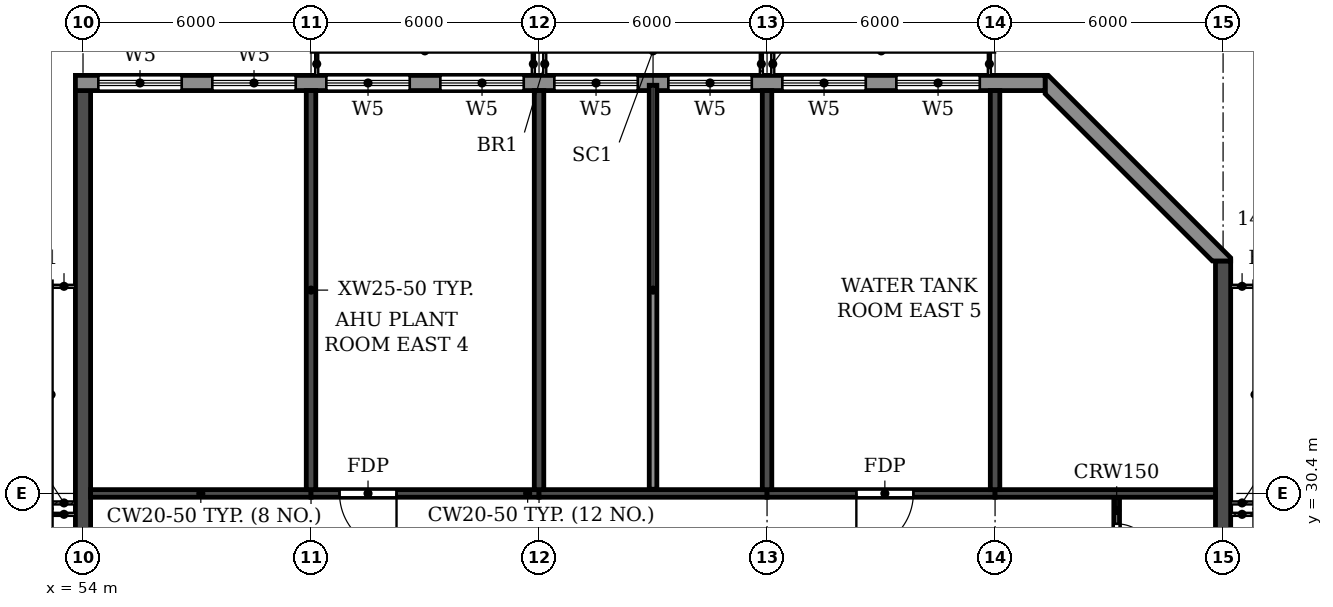
"""IFC4 building model, lengths in metres.
Left out: names, types, materials, properties, quantities, classifications, styles, units other than length and angle.
Written with IfcOpenShell. Run it as: python <this file> out.ifc"""

import sys

from ifc_helpers import new_model, si_unit, direction, frame, frame_2d, origin, place, context, subcontext, project, spatial, polyline, rectangle, outline, extrude, element, fill, save


model = new_model("IFC4")
c1 = context("Model", 3, precision=1e-05, world=origin(), true_north=direction((0.0, 1.0)))
c2 = subcontext(c1, "Body", "Model", "MODEL_VIEW")
j1 = project(units=[si_unit("LENGTHUNIT", "METRE"), si_unit("PLANEANGLEUNIT", "RADIAN")], contexts=[c1])
p1 = place(None, origin())
s1 = spatial("IfcSite", under=j1, at=p1, CompositionType="ELEMENT")
p2 = place(p1, origin())
s2 = spatial("IfcBuilding", under=s1, at=p2, CompositionType="ELEMENT")
p3 = place(p2, frame((0.0, 0.0, 279.0)))
s3 = spatial("IfcBuildingStorey", under=s2, at=p3, CompositionType="ELEMENT", Elevation=279.0)
for number, where, z_axis, x_axis in (
    (1, (60.0, 30.5, 0.0), (0.0, 0.0, 1.0), (0.0, 1.0, 0.0)),
    (2, (66.0, 30.5, 0.0), (0.0, 0.0, 1.0), (0.0, 1.0, 0.0)),
    (3, (72.0, 30.5, 0.0), (0.0, 0.0, 1.0), (0.0, 1.0, 0.0)),
    (4, (78.0, 30.5, 0.0), (0.0, 0.0, 1.0), (0.0, 1.0, 0.0)),
):
    element("IfcWall", number, at=place(p3, frame(where, z_axis=z_axis, x_axis=x_axis)), inside=s3, PredefinedType="SHEAR", context=c2, shape_type="SweptSolid", body=[
        extrude(rectangle(XDim=10.5, YDim=0.25, at=frame_2d((5.25, 0.0))), origin(), (0.0, 0.0, 1.0), 3.05),
    ])
p4 = place(p3, frame((54.0, 0.2, 0.0), z_axis=(0.0, 0.0, 1.0), x_axis=(0.0, 1.0, 0.0)))
e5 = element("IfcWall", 5, at=p4, inside=s3, PredefinedType="SHEAR", context=c2, shape_type="SweptSolid", body=[
    extrude(rectangle(XDim=40.8, YDim=0.4, at=frame_2d((20.4, 0.0))), origin(), (0.0, 0.0, 1.0), 3.05),
])
p5 = place(p3, frame((84.0, 4.683, 0.0), z_axis=(0.0, 0.0, 1.0), x_axis=(0.0, 1.0, 0.0)))
e6 = element("IfcWall", 6, at=p5, inside=s3, PredefinedType="SHEAR", context=c2, shape_type="SweptSolid", body=[
    extrude(rectangle(XDim=31.834, YDim=0.4, at=frame_2d((15.917, 0.0))), origin(), (0.0, 0.0, 1.0), 3.05),
])
p6 = place(p3, frame((54.2, 30.4, 0.0), z_axis=(0.0, 0.0, 1.0), x_axis=(1.0, 0.0, 0.0)))
e7 = element("IfcWall", 7, at=p6, inside=s3, PredefinedType="SHEAR", context=c2, shape_type="SweptSolid", body=[
    extrude(rectangle(XDim=5.8, YDim=0.2, at=frame_2d((2.9, 0.0))), origin(), (0.0, 0.0, 1.0), 2.45),
])
p7 = place(p3, frame((60.0, 30.4, 0.0), z_axis=(0.0, 0.0, 1.0), x_axis=(1.0, 0.0, 0.0)))
e8 = element("IfcWall", 8, at=p7, inside=s3, PredefinedType="SHEAR", context=c2, shape_type="SweptSolid", body=[
    extrude(rectangle(XDim=6.0, YDim=0.2, at=frame_2d((3.0, 0.0))), origin(), (0.0, 0.0, 1.0), 2.45),
])
p8 = place(p7, frame((0.75, 0.0, 0.0)))
e9 = element("IfcOpeningElement", 9, at=p8, cuts=e8, PredefinedType="OPENING", context=c2, shape_type="SweptSolid", body=[
    extrude(rectangle(XDim=1.5, YDim=2.1, at=frame_2d((0.75, 1.05))), frame((0.0, 0.11, 0.0), z_axis=(0.0, -1.0, 0.0), x_axis=(1.0, 0.0, 0.0)), (0.0, 0.0, 1.0), 0.22),
])
p9 = place(p3, frame((66.0, 30.4, 0.0), z_axis=(0.0, 0.0, 1.0), x_axis=(1.0, 0.0, 0.0)))
e10 = element("IfcWall", 10, at=p9, inside=s3, PredefinedType="SHEAR", context=c2, shape_type="SweptSolid", body=[
    extrude(rectangle(XDim=6.0, YDim=0.2, at=frame_2d((3.0, 0.0))), origin(), (0.0, 0.0, 1.0), 2.45),
])
p10 = place(p3, frame((72.0, 30.4, 0.0), z_axis=(0.0, 0.0, 1.0), x_axis=(1.0, 0.0, 0.0)))
e11 = element("IfcWall", 11, at=p10, inside=s3, PredefinedType="SHEAR", context=c2, shape_type="SweptSolid", body=[
    extrude(rectangle(XDim=6.0, YDim=0.2, at=frame_2d((3.0, 0.0))), origin(), (0.0, 0.0, 1.0), 2.45),
])
p11 = place(p10, frame((2.35, 0.0, 0.0)))
e12 = element("IfcOpeningElement", 12, at=p11, cuts=e11, PredefinedType="OPENING", context=c2, shape_type="SweptSolid", body=[
    extrude(rectangle(XDim=1.5, YDim=2.1, at=frame_2d((0.75, 1.05))), frame((0.0, 0.11, 0.0), z_axis=(0.0, -1.0, 0.0), x_axis=(1.0, 0.0, 0.0)), (0.0, 0.0, 1.0), 0.22),
])
p12 = place(p3, frame((78.0, 30.4, 0.0), z_axis=(0.0, 0.0, 1.0), x_axis=(1.0, 0.0, 0.0)))
e13 = element("IfcWall", 13, at=p12, inside=s3, PredefinedType="SHEAR", context=c2, shape_type="SweptSolid", body=[
    extrude(rectangle(XDim=5.8, YDim=0.2, at=frame_2d((2.9, 0.0))), origin(), (0.0, 0.0, 1.0), 2.45),
])
p13 = place(p3, origin())
e14 = element("IfcWall", 14, at=p13, inside=s3, PredefinedType="STANDARD", context=c2, shape_type="SweptSolid", body=[
    extrude(outline(polyline([(84.2, 36.517), (84.2, 36.6), (79.4, 41.4), (79.317, 41.4), (79.317, 40.917), (83.717, 36.517), (84.2, 36.517)])), origin(), (0.0, 0.0, 1.0), 3.05),
])
p14 = place(p3, frame((79.317, 41.2, 0.0), z_axis=(0.0, 0.0, 1.0), x_axis=(-1.0, 0.0, 0.0)))
e15 = element("IfcWall", 15, at=p14, inside=s3, PredefinedType="STANDARD", context=c2, shape_type="SweptSolid", body=[
    extrude(rectangle(XDim=25.517, YDim=0.4, at=frame_2d((12.759, 0.0))), origin(), (0.0, 0.0, 1.0), 3.05),
])
p15 = place(p14, frame((22.717, 0.0, 0.6)))
e16 = element("IfcOpeningElement", 16, at=p15, cuts=e15, PredefinedType="OPENING", context=c2, shape_type="SweptSolid", body=[
    extrude(rectangle(XDim=2.2, YDim=2.4, at=frame_2d((1.1, 1.2))), frame((0.0, 0.21, 0.0), z_axis=(0.0, -1.0, 0.0), x_axis=(1.0, 0.0, 0.0)), (0.0, 0.0, 1.0), 0.42),
])
p16 = place(p14, frame((19.717, 0.0, 0.6)))
e17 = element("IfcOpeningElement", 17, at=p16, cuts=e15, PredefinedType="OPENING", context=c2, shape_type="SweptSolid", body=[
    extrude(rectangle(XDim=2.2, YDim=2.4, at=frame_2d((1.1, 1.2))), frame((0.0, 0.21, 0.0), z_axis=(0.0, -1.0, 0.0), x_axis=(1.0, 0.0, 0.0)), (0.0, 0.0, 1.0), 0.42),
])
p17 = place(p14, frame((16.717, 0.0, 0.6)))
e18 = element("IfcOpeningElement", 18, at=p17, cuts=e15, PredefinedType="OPENING", context=c2, shape_type="SweptSolid", body=[
    extrude(rectangle(XDim=2.2, YDim=2.4, at=frame_2d((1.1, 1.2))), frame((0.0, 0.21, 0.0), z_axis=(0.0, -1.0, 0.0), x_axis=(1.0, 0.0, 0.0)), (0.0, 0.0, 1.0), 0.42),
])
p18 = place(p14, frame((13.717, 0.0, 0.6)))
e19 = element("IfcOpeningElement", 19, at=p18, cuts=e15, PredefinedType="OPENING", context=c2, shape_type="SweptSolid", body=[
    extrude(rectangle(XDim=2.2, YDim=2.4, at=frame_2d((1.1, 1.2))), frame((0.0, 0.21, 0.0), z_axis=(0.0, -1.0, 0.0), x_axis=(1.0, 0.0, 0.0)), (0.0, 0.0, 1.0), 0.42),
])
p19 = place(p14, frame((10.717, 0.0, 0.6)))
e20 = element("IfcOpeningElement", 20, at=p19, cuts=e15, PredefinedType="OPENING", context=c2, shape_type="SweptSolid", body=[
    extrude(rectangle(XDim=2.2, YDim=2.4, at=frame_2d((1.1, 1.2))), frame((0.0, 0.21, 0.0), z_axis=(0.0, -1.0, 0.0), x_axis=(1.0, 0.0, 0.0)), (0.0, 0.0, 1.0), 0.42),
])
p20 = place(p14, frame((7.717, 0.0, 0.6)))
e21 = element("IfcOpeningElement", 21, at=p20, cuts=e15, PredefinedType="OPENING", context=c2, shape_type="SweptSolid", body=[
    extrude(rectangle(XDim=2.2, YDim=2.4, at=frame_2d((1.1, 1.2))), frame((0.0, 0.21, 0.0), z_axis=(0.0, -1.0, 0.0), x_axis=(1.0, 0.0, 0.0)), (0.0, 0.0, 1.0), 0.42),
])
p21 = place(p14, frame((4.717, 0.0, 0.6)))
e22 = element("IfcOpeningElement", 22, at=p21, cuts=e15, PredefinedType="OPENING", context=c2, shape_type="SweptSolid", body=[
    extrude(rectangle(XDim=2.2, YDim=2.4, at=frame_2d((1.1, 1.2))), frame((0.0, 0.21, 0.0), z_axis=(0.0, -1.0, 0.0), x_axis=(1.0, 0.0, 0.0)), (0.0, 0.0, 1.0), 0.42),
])
p22 = place(p14, frame((1.717, 0.0, 0.6)))
e23 = element("IfcOpeningElement", 23, at=p22, cuts=e15, PredefinedType="OPENING", context=c2, shape_type="SweptSolid", body=[
    extrude(rectangle(XDim=2.2, YDim=2.4, at=frame_2d((1.1, 1.2))), frame((0.0, 0.21, 0.0), z_axis=(0.0, -1.0, 0.0), x_axis=(1.0, 0.0, 0.0)), (0.0, 0.0, 1.0), 0.42),
])
p23 = place(p3, frame((81.2, 27.9, 0.0), z_axis=(0.0, 0.0, 1.0), x_axis=(0.0, 1.0, 0.0)))
e24 = element("IfcWall", 24, at=p23, inside=s3, PredefinedType="PARTITIONING", context=c2, shape_type="SweptSolid", body=[
    extrude(rectangle(XDim=2.39, YDim=0.15, at=frame_2d((1.195, 0.0))), origin(), (0.0, 0.0, 1.0), 3.05),
])
p24 = place(p23, frame((0.7, 0.0, 0.0)))
e25 = element("IfcOpeningElement", 25, at=p24, cuts=e24, PredefinedType="OPENING", context=c2, shape_type="SweptSolid", body=[
    extrude(rectangle(XDim=1.0, YDim=2.1, at=frame_2d((0.5, 1.05))), frame((0.0, 0.085, 0.0), z_axis=(0.0, -1.0, 0.0), x_axis=(1.0, 0.0, 0.0)), (0.0, 0.0, 1.0), 0.17),
])
p25 = place(p3, frame((69.0, 30.51, 0.0), z_axis=(0.0, 0.0, 1.0), x_axis=(0.0, 1.0, 0.0)))
e26 = element("IfcWall", 26, at=p25, inside=s3, PredefinedType="PARTITIONING", context=c2, shape_type="SweptSolid", body=[
    extrude(rectangle(XDim=10.63, YDim=0.2, at=frame_2d((5.315, 0.0))), origin(), (0.0, 0.0, 1.0), 3.05),
])
p26 = place(p15, origin())
e27 = element("IfcWindow", 27, at=p26, inside=s3, PartitioningType="TRIPLE_PANEL_HORIZONTAL", PredefinedType="WINDOW", context=c2, shape_type="SweptSolid", body=[
    extrude(rectangle(XDim=2.2, YDim=2.4, at=frame_2d((1.1, 1.2))), frame((0.0, 0.03, 0.0), z_axis=(0.0, -1.0, 0.0), x_axis=(1.0, 0.0, 0.0)), (0.0, 0.0, 1.0), 0.06),
])
fill(e16, e27)
p27 = place(p16, origin())
e28 = element("IfcWindow", 28, at=p27, inside=s3, PartitioningType="TRIPLE_PANEL_HORIZONTAL", PredefinedType="WINDOW", context=c2, shape_type="SweptSolid", body=[
    extrude(rectangle(XDim=2.2, YDim=2.4, at=frame_2d((1.1, 1.2))), frame((0.0, 0.03, 0.0), z_axis=(0.0, -1.0, 0.0), x_axis=(1.0, 0.0, 0.0)), (0.0, 0.0, 1.0), 0.06),
])
fill(e17, e28)
p28 = place(p17, origin())
e29 = element("IfcWindow", 29, at=p28, inside=s3, PartitioningType="TRIPLE_PANEL_HORIZONTAL", PredefinedType="WINDOW", context=c2, shape_type="SweptSolid", body=[
    extrude(rectangle(XDim=2.2, YDim=2.4, at=frame_2d((1.1, 1.2))), frame((0.0, 0.03, 0.0), z_axis=(0.0, -1.0, 0.0), x_axis=(1.0, 0.0, 0.0)), (0.0, 0.0, 1.0), 0.06),
])
fill(e18, e29)
p29 = place(p18, origin())
e30 = element("IfcWindow", 30, at=p29, inside=s3, PartitioningType="TRIPLE_PANEL_HORIZONTAL", PredefinedType="WINDOW", context=c2, shape_type="SweptSolid", body=[
    extrude(rectangle(XDim=2.2, YDim=2.4, at=frame_2d((1.1, 1.2))), frame((0.0, 0.03, 0.0), z_axis=(0.0, -1.0, 0.0), x_axis=(1.0, 0.0, 0.0)), (0.0, 0.0, 1.0), 0.06),
])
fill(e19, e30)
p30 = place(p19, origin())
e31 = element("IfcWindow", 31, at=p30, inside=s3, PartitioningType="TRIPLE_PANEL_HORIZONTAL", PredefinedType="WINDOW", context=c2, shape_type="SweptSolid", body=[
    extrude(rectangle(XDim=2.2, YDim=2.4, at=frame_2d((1.1, 1.2))), frame((0.0, 0.03, 0.0), z_axis=(0.0, -1.0, 0.0), x_axis=(1.0, 0.0, 0.0)), (0.0, 0.0, 1.0), 0.06),
])
fill(e20, e31)
p31 = place(p20, origin())
e32 = element("IfcWindow", 32, at=p31, inside=s3, PartitioningType="TRIPLE_PANEL_HORIZONTAL", PredefinedType="WINDOW", context=c2, shape_type="SweptSolid", body=[
    extrude(rectangle(XDim=2.2, YDim=2.4, at=frame_2d((1.1, 1.2))), frame((0.0, 0.03, 0.0), z_axis=(0.0, -1.0, 0.0), x_axis=(1.0, 0.0, 0.0)), (0.0, 0.0, 1.0), 0.06),
])
fill(e21, e32)
p32 = place(p21, origin())
e33 = element("IfcWindow", 33, at=p32, inside=s3, PartitioningType="TRIPLE_PANEL_HORIZONTAL", PredefinedType="WINDOW", context=c2, shape_type="SweptSolid", body=[
    extrude(rectangle(XDim=2.2, YDim=2.4, at=frame_2d((1.1, 1.2))), frame((0.0, 0.03, 0.0), z_axis=(0.0, -1.0, 0.0), x_axis=(1.0, 0.0, 0.0)), (0.0, 0.0, 1.0), 0.06),
])
fill(e22, e33)
p33 = place(p22, origin())
e34 = element("IfcWindow", 34, at=p33, inside=s3, PartitioningType="TRIPLE_PANEL_HORIZONTAL", PredefinedType="WINDOW", context=c2, shape_type="SweptSolid", body=[
    extrude(rectangle(XDim=2.2, YDim=2.4, at=frame_2d((1.1, 1.2))), frame((0.0, 0.03, 0.0), z_axis=(0.0, -1.0, 0.0), x_axis=(1.0, 0.0, 0.0)), (0.0, 0.0, 1.0), 0.06),
])
fill(e23, e34)
p34 = place(p8, frame((1.5, 0.0, 0.0), z_axis=(0.0, 0.0, 1.0), x_axis=(-1.0, 0.0, 0.0)))
e35 = element("IfcDoor", 35, at=p34, inside=s3, OperationType="DOUBLE_DOOR_SINGLE_SWING", PredefinedType="DOOR", context=c2, shape_type="SweptSolid", body=[
    extrude(rectangle(XDim=1.5, YDim=2.1, at=frame_2d((0.75, 1.05))), frame((0.0, 0.025, 0.0), z_axis=(0.0, -1.0, 0.0), x_axis=(1.0, 0.0, 0.0)), (0.0, 0.0, 1.0), 0.05),
])
fill(e9, e35)
p35 = place(p11, frame((1.5, 0.0, 0.0), z_axis=(0.0, 0.0, 1.0), x_axis=(-1.0, 0.0, 0.0)))
e36 = element("IfcDoor", 36, at=p35, inside=s3, OperationType="DOUBLE_DOOR_SINGLE_SWING", PredefinedType="DOOR", context=c2, shape_type="SweptSolid", body=[
    extrude(rectangle(XDim=1.5, YDim=2.1, at=frame_2d((0.75, 1.05))), frame((0.0, 0.025, 0.0), z_axis=(0.0, -1.0, 0.0), x_axis=(1.0, 0.0, 0.0)), (0.0, 0.0, 1.0), 0.05),
])
fill(e12, e36)
p36 = place(p24, frame((1.0, 0.0, 0.0), z_axis=(0.0, 0.0, 1.0), x_axis=(-1.0, 0.0, 0.0)))
e37 = element("IfcDoor", 37, at=p36, inside=s3, OperationType="SINGLE_SWING_RIGHT", PredefinedType="DOOR", context=c2, shape_type="SweptSolid", body=[
    extrude(rectangle(XDim=1.0, YDim=2.1, at=frame_2d((0.5, 1.05))), frame((0.0, 0.025, 0.0), z_axis=(0.0, -1.0, 0.0), x_axis=(1.0, 0.0, 0.0)), (0.0, 0.0, 1.0), 0.05),
])
fill(e25, e37)
save(model, sys.argv[1])
